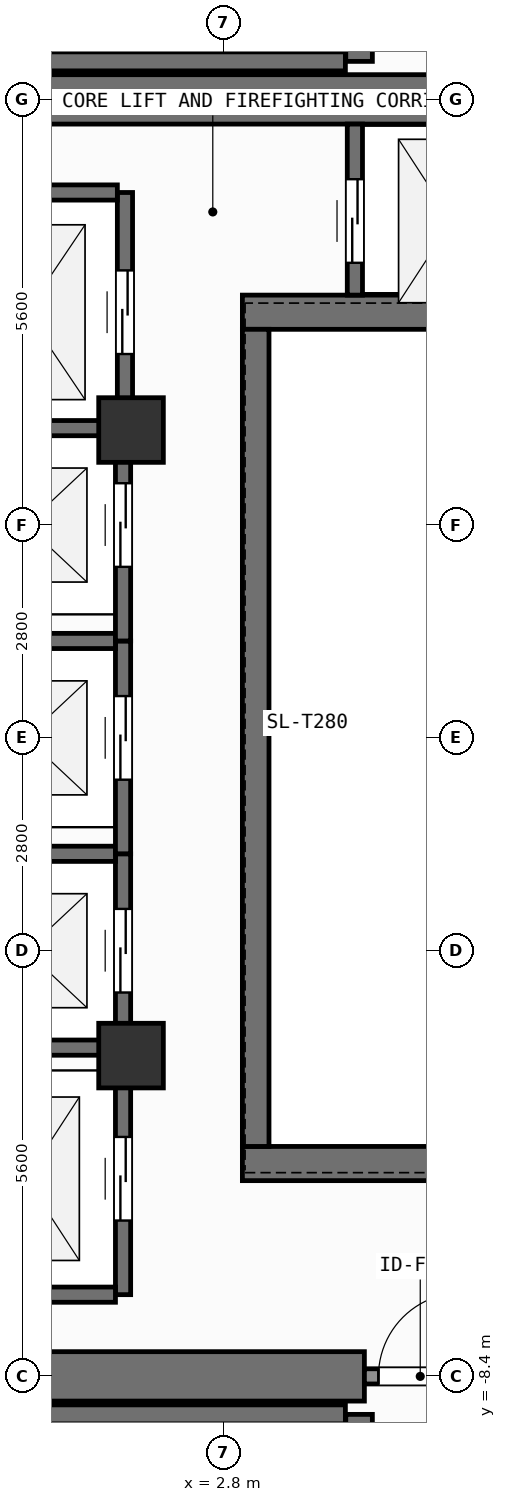
"""IFC4 building model, lengths in metres.
Left out: names, types, materials, properties, quantities, classifications, styles, units other than length and angle.
Written with IfcOpenShell. Run it as: python <this file> out.ifc"""

import sys

from ifc_helpers import new_model, si_unit, direction, frame, frame_2d, origin, origin_2d, place, context, subcontext, project, spatial, rectangle, extrude, element, fill, save


model = new_model("IFC4")
c1 = context("Model", 3, precision=1e-05, world=origin(), true_north=direction((0.0, 1.0)))
c2 = subcontext(c1, "Body", "Model", "MODEL_VIEW")
j1 = project(units=[si_unit("LENGTHUNIT", "METRE"), si_unit("PLANEANGLEUNIT", "RADIAN")], contexts=[c1])
p1 = place(None, origin())
s1 = spatial("IfcSite", under=j1, at=p1, CompositionType="ELEMENT")
p2 = place(p1, origin())
s2 = spatial("IfcBuilding", under=s1, at=p2, CompositionType="ELEMENT")
p3 = place(p2, frame((0.0, 0.0, 254.7)))
s3 = spatial("IfcBuildingStorey", under=s2, at=p3, CompositionType="ELEMENT", Elevation=254.7)
p4 = place(p3, frame((-2.62, -8.4, 0.0), z_axis=(0.0, 0.0, 1.0), x_axis=(1.0, 0.0, 0.0)))
e1 = element("IfcWall", 1, at=p4, inside=s3, PredefinedType="SHEAR", context=c2, shape_type="SweptSolid", body=[
    extrude(rectangle(XDim=7.27, YDim=0.65, at=frame_2d((3.635, 0.0))), origin(), (0.0, 0.0, 1.0), 3.9),
])
p5 = place(p3, frame((-7.55, 8.4, 0.0), z_axis=(0.0, 0.0, 1.0), x_axis=(1.0, 0.0, 0.0)))
e2 = element("IfcWall", 2, at=p5, inside=s3, PredefinedType="SHEAR", context=c2, shape_type="SweptSolid", body=[
    extrude(rectangle(XDim=16.275, YDim=0.65, at=frame_2d((8.138, 0.0))), origin(), (0.0, 0.0, 1.0), 3.9),
])
for number, where, z_axis, x_axis in (
    (3, (3.045, -5.6, 0.0), (0.0, 0.0, 1.0), (1.0, 0.0, 0.0)),
    (4, (3.045, 5.6, 0.0), (0.0, 0.0, 1.0), (1.0, 0.0, 0.0)),
):
    element("IfcWall", number, at=place(p3, frame(where, z_axis=z_axis, x_axis=x_axis)), inside=s3, PredefinedType="SHEAR", context=c2, shape_type="SweptSolid", body=[
        extrude(rectangle(XDim=5.68, YDim=0.45, at=frame_2d((2.84, 0.0))), origin(), (0.0, 0.0, 1.0), 3.9),
    ])
p6 = place(p3, frame((3.22, -5.375, 0.0), z_axis=(0.0, 0.0, 1.0), x_axis=(0.0, 1.0, 0.0)))
e5 = element("IfcWall", 5, at=p6, inside=s3, PredefinedType="SHEAR", context=c2, shape_type="SweptSolid", body=[
    extrude(rectangle(XDim=10.75, YDim=0.35, at=frame_2d((5.375, 0.0))), origin(), (0.0, 0.0, 1.0), 3.9),
])
p7 = place(p3, frame((-2.2, -8.9, 0.0), z_axis=(0.0, 0.0, 1.0), x_axis=(1.0, 0.0, 0.0)))
e6 = element("IfcWall", 6, at=p7, inside=s3, PredefinedType="SHEAR", context=c2, shape_type="SweptSolid", body=[
    extrude(rectangle(XDim=6.6, YDim=0.25, at=frame_2d((3.3, 0.0))), origin(), (0.0, 0.0, 1.0), 3.9),
])
p8 = place(p3, frame((4.58, -8.9, 0.0), z_axis=(0.0, 0.0, 1.0), x_axis=(0.0, -1.0, 0.0)))
e7 = element("IfcWall", 7, at=p8, inside=s3, PredefinedType="SHEAR", context=c2, shape_type="SweptSolid", body=[
    extrude(rectangle(XDim=2.925, YDim=0.35, at=frame_2d((1.462, 0.0))), origin(), (0.0, 0.0, 1.0), 3.9),
])
p9 = place(p8, frame((0.913, 0.0, 0.0)))
e8 = element("IfcOpeningElement", 8, at=p9, cuts=e7, PredefinedType="OPENING", context=c2, shape_type="SweptSolid", body=[
    extrude(rectangle(XDim=1.1, YDim=2.15, at=frame_2d((0.55, 1.075))), frame((0.0, 0.185, 0.0), z_axis=(0.0, -1.0, 0.0), x_axis=(1.0, 0.0, 0.0)), (0.0, 0.0, 1.0), 0.37),
])
p10 = place(p3, frame((-2.2, 8.9, 0.0), z_axis=(0.0, 0.0, 1.0), x_axis=(1.0, 0.0, 0.0)))
e9 = element("IfcWall", 9, at=p10, inside=s3, PredefinedType="SHEAR", context=c2, shape_type="SweptSolid", body=[
    extrude(rectangle(XDim=6.6, YDim=0.25, at=frame_2d((3.3, 0.0))), origin(), (0.0, 0.0, 1.0), 3.9),
])
p11 = place(p3, frame((4.58, 11.825, 0.0), z_axis=(0.0, 0.0, 1.0), x_axis=(0.0, -1.0, 0.0)))
e10 = element("IfcWall", 10, at=p11, inside=s3, PredefinedType="SHEAR", context=c2, shape_type="SweptSolid", body=[
    extrude(rectangle(XDim=2.925, YDim=0.35, at=frame_2d((1.462, 0.0))), origin(), (0.0, 0.0, 1.0), 3.9),
])
p12 = place(p11, frame((0.913, 0.0, 0.0)))
e11 = element("IfcOpeningElement", 11, at=p12, cuts=e10, PredefinedType="OPENING", context=c2, shape_type="SweptSolid", body=[
    extrude(rectangle(XDim=1.1, YDim=2.15, at=frame_2d((0.55, 1.075))), frame((0.0, 0.185, 0.0), z_axis=(0.0, -1.0, 0.0), x_axis=(1.0, 0.0, 0.0)), (0.0, 0.0, 1.0), 0.37),
])
for number, where, z_axis, x_axis in (
    (12, (1.58, -4.18, 0.0), (0.0, 0.0, 1.0), (1.0, 0.0, 0.0)),
    (13, (1.58, 4.05, 0.0), (0.0, 0.0, 1.0), (1.0, 0.0, 0.0)),
):
    element("IfcColumn", number, at=place(p3, frame(where, z_axis=z_axis, x_axis=x_axis)), inside=s3, PredefinedType="COLUMN", context=c2, shape_type="SweptSolid", body=[
        extrude(rectangle(XDim=0.85, YDim=0.85, at=origin_2d()), origin(), (0.0, 0.0, 1.0), 3.9),
    ])
p13 = place(p3, frame((1.475, -4.275, 0.0), z_axis=(0.0, 0.0, 1.0), x_axis=(0.0, 1.0, 0.0)))
e14 = element("IfcWall", 14, at=p13, inside=s3, PredefinedType="SHEAR", context=c2, shape_type="SweptSolid", body=[
    extrude(rectangle(XDim=2.75, YDim=0.2, at=frame_2d((1.375, 0.0))), origin(), (0.0, 0.0, 1.0), 3.68),
])
p14 = place(p13, frame((0.925, 0.0, 0.0)))
e15 = element("IfcOpeningElement", 15, at=p14, cuts=e14, PredefinedType="OPENING", context=c2, shape_type="SweptSolid", body=[
    extrude(rectangle(XDim=1.1, YDim=2.2, at=frame_2d((0.55, 1.1))), frame((0.0, 0.11, 0.0), z_axis=(0.0, -1.0, 0.0), x_axis=(1.0, 0.0, 0.0)), (0.0, 0.0, 1.0), 0.22),
])
for number, where, z_axis, x_axis in (
    (16, (-0.975, -4.075, 0.0), (0.0, 0.0, 1.0), (1.0, 0.0, 0.0)),
    (17, (-0.975, -1.525, 0.0), (0.0, 0.0, 1.0), (1.0, 0.0, 0.0)),
):
    element("IfcWall", number, at=place(p3, frame(where, z_axis=z_axis, x_axis=x_axis)), inside=s3, PredefinedType="SHEAR", context=c2, shape_type="SweptSolid", body=[
        extrude(rectangle(XDim=2.35, YDim=0.2, at=frame_2d((1.175, 0.0))), origin(), (0.0, 0.0, 1.0), 3.68),
    ])
p15 = place(p3, frame((1.475, -1.525, 0.0), z_axis=(0.0, 0.0, 1.0), x_axis=(0.0, 1.0, 0.0)))
e18 = element("IfcWall", 18, at=p15, inside=s3, PredefinedType="SHEAR", context=c2, shape_type="SweptSolid", body=[
    extrude(rectangle(XDim=2.8, YDim=0.2, at=frame_2d((1.4, 0.0))), origin(), (0.0, 0.0, 1.0), 3.68),
])
p16 = place(p15, frame((0.975, 0.0, 0.0)))
e19 = element("IfcOpeningElement", 19, at=p16, cuts=e18, PredefinedType="OPENING", context=c2, shape_type="SweptSolid", body=[
    extrude(rectangle(XDim=1.1, YDim=2.2, at=frame_2d((0.55, 1.1))), frame((0.0, 0.11, 0.0), z_axis=(0.0, -1.0, 0.0), x_axis=(1.0, 0.0, 0.0)), (0.0, 0.0, 1.0), 0.22),
])
p17 = place(p3, frame((-0.975, 1.275, 0.0), z_axis=(0.0, 0.0, 1.0), x_axis=(1.0, 0.0, 0.0)))
e20 = element("IfcWall", 20, at=p17, inside=s3, PredefinedType="SHEAR", context=c2, shape_type="SweptSolid", body=[
    extrude(rectangle(XDim=2.35, YDim=0.2, at=frame_2d((1.175, 0.0))), origin(), (0.0, 0.0, 1.0), 3.68),
])
p18 = place(p3, frame((1.475, 1.275, 0.0), z_axis=(0.0, 0.0, 1.0), x_axis=(0.0, 1.0, 0.0)))
e21 = element("IfcWall", 21, at=p18, inside=s3, PredefinedType="SHEAR", context=c2, shape_type="SweptSolid", body=[
    extrude(rectangle(XDim=2.8, YDim=0.2, at=frame_2d((1.4, 0.0))), origin(), (0.0, 0.0, 1.0), 3.68),
])
p19 = place(p18, frame((0.975, 0.0, 0.0)))
e22 = element("IfcOpeningElement", 22, at=p19, cuts=e21, PredefinedType="OPENING", context=c2, shape_type="SweptSolid", body=[
    extrude(rectangle(XDim=1.1, YDim=2.2, at=frame_2d((0.55, 1.1))), frame((0.0, 0.11, 0.0), z_axis=(0.0, -1.0, 0.0), x_axis=(1.0, 0.0, 0.0)), (0.0, 0.0, 1.0), 0.22),
])
p20 = place(p3, frame((-0.975, 4.075, 0.0), z_axis=(0.0, 0.0, 1.0), x_axis=(1.0, 0.0, 0.0)))
e23 = element("IfcWall", 23, at=p20, inside=s3, PredefinedType="SHEAR", context=c2, shape_type="SweptSolid", body=[
    extrude(rectangle(XDim=2.35, YDim=0.2, at=frame_2d((1.175, 0.0))), origin(), (0.0, 0.0, 1.0), 3.68),
])
p21 = place(p3, frame((1.5, 4.025, 0.0), z_axis=(0.0, 0.0, 1.0), x_axis=(0.0, 1.0, 0.0)))
e24 = element("IfcWall", 24, at=p21, inside=s3, PredefinedType="SHEAR", context=c2, shape_type="SweptSolid", body=[
    extrude(rectangle(XDim=3.15, YDim=0.2, at=frame_2d((1.575, 0.0))), origin(), (0.0, 0.0, 1.0), 3.68),
])
p22 = place(p21, frame((1.025, 0.0, 0.0)))
e25 = element("IfcOpeningElement", 25, at=p22, cuts=e24, PredefinedType="OPENING", context=c2, shape_type="SweptSolid", body=[
    extrude(rectangle(XDim=1.1, YDim=2.2, at=frame_2d((0.55, 1.1))), frame((0.0, 0.11, 0.0), z_axis=(0.0, -1.0, 0.0), x_axis=(1.0, 0.0, 0.0)), (0.0, 0.0, 1.0), 0.22),
])
p23 = place(p3, frame((-1.0, 7.175, 0.0), z_axis=(0.0, 0.0, 1.0), x_axis=(1.0, 0.0, 0.0)))
e26 = element("IfcWall", 26, at=p23, inside=s3, PredefinedType="SHEAR", context=c2, shape_type="SweptSolid", body=[
    extrude(rectangle(XDim=2.4, YDim=0.2, at=frame_2d((1.2, 0.0))), origin(), (0.0, 0.0, 1.0), 3.68),
])
p24 = place(p3, frame((1.475, -7.325, 0.0), z_axis=(0.0, 0.0, 1.0), x_axis=(0.0, 1.0, 0.0)))
e27 = element("IfcWall", 27, at=p24, inside=s3, PredefinedType="SHEAR", context=c2, shape_type="SweptSolid", body=[
    extrude(rectangle(XDim=3.05, YDim=0.2, at=frame_2d((1.525, 0.0))), origin(), (0.0, 0.0, 1.0), 3.68),
])
p25 = place(p24, frame((0.975, 0.0, 0.0)))
e28 = element("IfcOpeningElement", 28, at=p25, cuts=e27, PredefinedType="OPENING", context=c2, shape_type="SweptSolid", body=[
    extrude(rectangle(XDim=1.1, YDim=2.2, at=frame_2d((0.55, 1.1))), frame((0.0, 0.11, 0.0), z_axis=(0.0, -1.0, 0.0), x_axis=(1.0, 0.0, 0.0)), (0.0, 0.0, 1.0), 0.22),
])
p26 = place(p3, frame((-0.975, -7.325, 0.0), z_axis=(0.0, 0.0, 1.0), x_axis=(1.0, 0.0, 0.0)))
e29 = element("IfcWall", 29, at=p26, inside=s3, PredefinedType="SHEAR", context=c2, shape_type="SweptSolid", body=[
    extrude(rectangle(XDim=2.35, YDim=0.2, at=frame_2d((1.175, 0.0))), origin(), (0.0, 0.0, 1.0), 3.68),
])
p27 = place(p3, frame((4.525, 5.825, 0.0), z_axis=(0.0, 0.0, 1.0), x_axis=(0.0, 1.0, 0.0)))
e30 = element("IfcWall", 30, at=p27, inside=s3, PredefinedType="SHEAR", context=c2, shape_type="SweptSolid", body=[
    extrude(rectangle(XDim=2.25, YDim=0.2, at=frame_2d((1.125, 0.0))), origin(), (0.0, 0.0, 1.0), 3.68),
])
p28 = place(p27, frame((0.425, 0.0, 0.0)))
e31 = element("IfcOpeningElement", 31, at=p28, cuts=e30, PredefinedType="OPENING", context=c2, shape_type="SweptSolid", body=[
    extrude(rectangle(XDim=1.1, YDim=2.2, at=frame_2d((0.55, 1.1))), frame((0.0, 0.11, 0.0), z_axis=(0.0, -1.0, 0.0), x_axis=(1.0, 0.0, 0.0)), (0.0, 0.0, 1.0), 0.22),
])
p29 = place(p3, frame((4.65, -8.4, 0.0), z_axis=(0.0, 0.0, 1.0), x_axis=(1.0, 0.0, 0.0)))
e32 = element("IfcWall", 32, at=p29, inside=s3, PredefinedType="SOLIDWALL", context=c2, shape_type="SweptSolid", body=[
    extrude(rectangle(XDim=1.47, YDim=0.2, at=frame_2d((0.735, 0.0))), origin(), (0.0, 0.0, 1.0), 2.92),
])
p30 = place(p29, frame((0.185, 0.0, 0.0)))
e33 = element("IfcOpeningElement", 33, at=p30, cuts=e32, PredefinedType="OPENING", context=c2, shape_type="SweptSolid", body=[
    extrude(rectangle(XDim=1.1, YDim=2.15, at=frame_2d((0.55, 1.075))), frame((0.0, 0.11, 0.0), z_axis=(0.0, -1.0, 0.0), x_axis=(1.0, 0.0, 0.0)), (0.0, 0.0, 1.0), 0.22),
])
p31 = place(p14, origin())
e34 = element("IfcDoor", 34, at=p31, inside=s3, OperationType="SLIDING_TO_LEFT", PredefinedType="DOOR", context=c2, shape_type="SweptSolid", body=[
    extrude(rectangle(XDim=1.1, YDim=2.2, at=frame_2d((0.55, 1.1))), frame((0.0, 0.025, 0.0), z_axis=(0.0, -1.0, 0.0), x_axis=(1.0, 0.0, 0.0)), (0.0, 0.0, 1.0), 0.05),
])
fill(e15, e34)
p32 = place(p16, origin())
e35 = element("IfcDoor", 35, at=p32, inside=s3, OperationType="SLIDING_TO_LEFT", PredefinedType="DOOR", context=c2, shape_type="SweptSolid", body=[
    extrude(rectangle(XDim=1.1, YDim=2.2, at=frame_2d((0.55, 1.1))), frame((0.0, 0.025, 0.0), z_axis=(0.0, -1.0, 0.0), x_axis=(1.0, 0.0, 0.0)), (0.0, 0.0, 1.0), 0.05),
])
fill(e19, e35)
p33 = place(p19, origin())
e36 = element("IfcDoor", 36, at=p33, inside=s3, OperationType="SLIDING_TO_LEFT", PredefinedType="DOOR", context=c2, shape_type="SweptSolid", body=[
    extrude(rectangle(XDim=1.1, YDim=2.2, at=frame_2d((0.55, 1.1))), frame((0.0, 0.025, 0.0), z_axis=(0.0, -1.0, 0.0), x_axis=(1.0, 0.0, 0.0)), (0.0, 0.0, 1.0), 0.05),
])
fill(e22, e36)
p34 = place(p22, origin())
e37 = element("IfcDoor", 37, at=p34, inside=s3, OperationType="SLIDING_TO_LEFT", PredefinedType="DOOR", context=c2, shape_type="SweptSolid", body=[
    extrude(rectangle(XDim=1.1, YDim=2.2, at=frame_2d((0.55, 1.1))), frame((0.0, 0.025, 0.0), z_axis=(0.0, -1.0, 0.0), x_axis=(1.0, 0.0, 0.0)), (0.0, 0.0, 1.0), 0.05),
])
fill(e25, e37)
p35 = place(p25, origin())
e38 = element("IfcDoor", 38, at=p35, inside=s3, OperationType="SLIDING_TO_LEFT", PredefinedType="DOOR", context=c2, shape_type="SweptSolid", body=[
    extrude(rectangle(XDim=1.1, YDim=2.2, at=frame_2d((0.55, 1.1))), frame((0.0, 0.025, 0.0), z_axis=(0.0, -1.0, 0.0), x_axis=(1.0, 0.0, 0.0)), (0.0, 0.0, 1.0), 0.05),
])
fill(e28, e38)
p36 = place(p28, origin())
e39 = element("IfcDoor", 39, at=p36, inside=s3, OperationType="SLIDING_TO_LEFT", PredefinedType="DOOR", context=c2, shape_type="SweptSolid", body=[
    extrude(rectangle(XDim=1.1, YDim=2.2, at=frame_2d((0.55, 1.1))), frame((0.0, 0.025, 0.0), z_axis=(0.0, -1.0, 0.0), x_axis=(1.0, 0.0, 0.0)), (0.0, 0.0, 1.0), 0.05),
])
fill(e31, e39)
p37 = place(p30, origin())
e40 = element("IfcDoor", 40, at=p37, inside=s3, OperationType="SINGLE_SWING_RIGHT", PredefinedType="DOOR", context=c2, shape_type="SweptSolid", body=[
    extrude(rectangle(XDim=1.1, YDim=2.15, at=frame_2d((0.55, 1.075))), frame((0.0, 0.025, 0.0), z_axis=(0.0, -1.0, 0.0), x_axis=(1.0, 0.0, 0.0)), (0.0, 0.0, 1.0), 0.05),
])
fill(e33, e40)
save(model, sys.argv[1])
